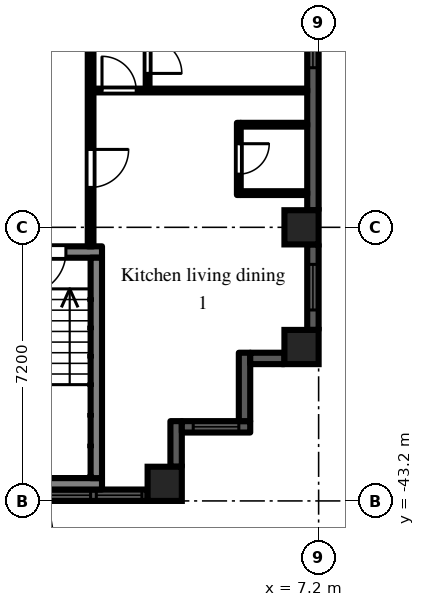
"""IFC4 building model, lengths in metres.
Left out: names, types, materials, properties, quantities, classifications, styles, units other than length and angle.
Written with IfcOpenShell. Run it as: python <this file> out.ifc"""

import sys

from ifc_helpers import new_model, si_unit, direction, frame, frame_2d, origin, origin_2d, place, context, subcontext, project, spatial, rectangle, extrude, element, fill, save


model = new_model("IFC4")
c1 = context("Model", 3, precision=1e-05, world=origin(), true_north=direction((0.0, 1.0)))
c2 = subcontext(c1, "Body", "Model", "MODEL_VIEW")
j1 = project(units=[si_unit("LENGTHUNIT", "METRE"), si_unit("PLANEANGLEUNIT", "RADIAN")], contexts=[c1])
p1 = place(None, origin())
s1 = spatial("IfcSite", under=j1, at=p1, CompositionType="ELEMENT")
p2 = place(p1, origin())
s2 = spatial("IfcBuilding", under=s1, at=p2, CompositionType="ELEMENT")
p3 = place(p2, frame((0.0, 0.0, 69.9)))
s3 = spatial("IfcBuildingStorey", under=s2, at=p3, CompositionType="ELEMENT", Elevation=69.9)
for number, where, z_axis, x_axis in (
    (1, (3.15, -42.75, 0.0), (0.0, 0.0, 1.0), (1.0, 0.0, 0.0)),
    (2, (6.75, -39.15, 0.0), (0.0, 0.0, 1.0), (1.0, 0.0, 0.0)),
    (3, (6.75, -36.0, 0.0), (0.0, 0.0, 1.0), (1.0, 0.0, 0.0)),
):
    element("IfcColumn", number, at=place(p3, frame(where, z_axis=z_axis, x_axis=x_axis)), inside=s3, PredefinedType="COLUMN", context=c2, shape_type="SweptSolid", body=[
        extrude(rectangle(XDim=0.9, YDim=0.9, at=origin_2d()), origin(), (0.0, 0.0, 1.0), 3.0),
    ])
p4 = place(p3, frame((-2.7, -43.05, 0.0), z_axis=(0.0, 0.0, 1.0), x_axis=(1.0, 0.0, 0.0)))
e4 = element("IfcWall", 4, at=p4, inside=s3, PredefinedType="SOLIDWALL", context=c2, shape_type="SweptSolid", body=[
    extrude(rectangle(XDim=5.4, YDim=0.3, at=frame_2d((2.7, 0.0))), origin(), (0.0, 0.0, 1.0), 2.1),
])
p5 = place(p4, frame((1.5, 0.0, 0.2)))
e5 = element("IfcOpeningElement", 5, at=p5, cuts=e4, PredefinedType="OPENING", context=c2, shape_type="SweptSolid", body=[
    extrude(rectangle(XDim=2.4, YDim=1.85, at=frame_2d((1.2, 0.925))), frame((0.0, 0.16, 0.0), z_axis=(0.0, -1.0, 0.0), x_axis=(1.0, 0.0, 0.0)), (0.0, 0.0, 1.0), 0.32),
])
p6 = place(p4, frame((0.15, 0.0, 0.2)))
e6 = element("IfcOpeningElement", 6, at=p6, cuts=e4, PredefinedType="OPENING", context=c2, shape_type="SweptSolid", body=[
    extrude(rectangle(XDim=1.2, YDim=1.85, at=frame_2d((0.6, 0.925))), frame((0.0, 0.16, 0.0), z_axis=(0.0, -1.0, 0.0), x_axis=(1.0, 0.0, 0.0)), (0.0, 0.0, 1.0), 0.32),
])
p7 = place(p4, frame((4.05, 0.0, 0.2)))
e7 = element("IfcOpeningElement", 7, at=p7, cuts=e4, PredefinedType="OPENING", context=c2, shape_type="SweptSolid", body=[
    extrude(rectangle(XDim=1.2, YDim=1.85, at=frame_2d((0.6, 0.925))), frame((0.0, 0.16, 0.0), z_axis=(0.0, -1.0, 0.0), x_axis=(1.0, 0.0, 0.0)), (0.0, 0.0, 1.0), 0.32),
])
p8 = place(p3, frame((3.45, -42.3, 0.0), z_axis=(0.0, 0.0, 1.0), x_axis=(0.0, 1.0, 0.0)))
e8 = element("IfcWall", 8, at=p8, inside=s3, PredefinedType="SOLIDWALL", context=c2, shape_type="SweptSolid", body=[
    extrude(rectangle(XDim=1.2, YDim=0.3, at=frame_2d((0.6, 0.0))), origin(), (0.0, 0.0, 1.0), 2.575),
])
p9 = place(p3, frame((3.6, -41.25, 0.0), z_axis=(0.0, 0.0, 1.0), x_axis=(1.0, 0.0, 0.0)))
e9 = element("IfcWall", 9, at=p9, inside=s3, PredefinedType="SOLIDWALL", context=c2, shape_type="SweptSolid", body=[
    extrude(rectangle(XDim=1.8, YDim=0.3, at=frame_2d((0.9, 0.0))), origin(), (0.0, 0.0, 1.0), 2.575),
])
p10 = place(p9, frame((0.3, 0.0, 0.2)))
e10 = element("IfcOpeningElement", 10, at=p10, cuts=e9, PredefinedType="OPENING", context=c2, shape_type="SweptSolid", body=[
    extrude(rectangle(XDim=1.2, YDim=1.85, at=frame_2d((0.6, 0.925))), frame((0.0, 0.16, 0.0), z_axis=(0.0, -1.0, 0.0), x_axis=(1.0, 0.0, 0.0)), (0.0, 0.0, 1.0), 0.32),
])
p11 = place(p3, frame((5.25, -41.1, 0.0), z_axis=(0.0, 0.0, 1.0), x_axis=(0.0, 1.0, 0.0)))
e11 = element("IfcWall", 11, at=p11, inside=s3, PredefinedType="SOLIDWALL", context=c2, shape_type="SweptSolid", body=[
    extrude(rectangle(XDim=1.8, YDim=0.3, at=frame_2d((0.9, 0.0))), origin(), (0.0, 0.0, 1.0), 2.575),
])
p12 = place(p3, frame((5.4, -39.45, 0.0), z_axis=(0.0, 0.0, 1.0), x_axis=(1.0, 0.0, 0.0)))
e12 = element("IfcWall", 12, at=p12, inside=s3, PredefinedType="SOLIDWALL", context=c2, shape_type="SweptSolid", body=[
    extrude(rectangle(XDim=0.9, YDim=0.3, at=frame_2d((0.45, 0.0))), origin(), (0.0, 0.0, 1.0), 2.575),
])
p13 = place(p3, frame((7.05, -38.7, 0.0), z_axis=(0.0, 0.0, 1.0), x_axis=(0.0, 1.0, 0.0)))
e13 = element("IfcWall", 13, at=p13, inside=s3, PredefinedType="SOLIDWALL", context=c2, shape_type="SweptSolid", body=[
    extrude(rectangle(XDim=2.25, YDim=0.3, at=frame_2d((1.125, 0.0))), origin(), (0.0, 0.0, 1.0), 2.1),
])
p14 = place(p13, frame((0.525, 0.0, 0.2)))
e14 = element("IfcOpeningElement", 14, at=p14, cuts=e13, PredefinedType="OPENING", context=c2, shape_type="SweptSolid", body=[
    extrude(rectangle(XDim=1.2, YDim=1.85, at=frame_2d((0.6, 0.925))), frame((0.0, 0.16, 0.0), z_axis=(0.0, -1.0, 0.0), x_axis=(1.0, 0.0, 0.0)), (0.0, 0.0, 1.0), 0.32),
])
p15 = place(p3, frame((7.05, -35.55, 0.0), z_axis=(0.0, 0.0, 1.0), x_axis=(0.0, 1.0, 0.0)))
e15 = element("IfcWall", 15, at=p15, inside=s3, PredefinedType="SOLIDWALL", context=c2, shape_type="SweptSolid", body=[
    extrude(rectangle(XDim=6.3, YDim=0.3, at=frame_2d((3.15, 0.0))), origin(), (0.0, 0.0, 1.0), 2.1),
])
p16 = place(p15, frame((3.75, 0.0, 0.2)))
e16 = element("IfcOpeningElement", 16, at=p16, cuts=e15, PredefinedType="OPENING", context=c2, shape_type="SweptSolid", body=[
    extrude(rectangle(XDim=2.4, YDim=1.85, at=frame_2d((1.2, 0.925))), frame((0.0, 0.16, 0.0), z_axis=(0.0, -1.0, 0.0), x_axis=(1.0, 0.0, 0.0)), (0.0, 0.0, 1.0), 0.32),
])
p17 = place(p3, frame((-1.5, -36.65, 0.0), z_axis=(0.0, 0.0, 1.0), x_axis=(1.0, 0.0, 0.0)))
e17 = element("IfcWall", 17, at=p17, inside=s3, PredefinedType="SHEAR", context=c2, shape_type="SweptSolid", body=[
    extrude(rectangle(XDim=3.0, YDim=0.3, at=frame_2d((1.5, 0.0))), origin(), (0.0, 0.0, 1.0), 2.575),
])
p18 = place(p17, frame((0.95, 0.0, 0.0)))
e18 = element("IfcOpeningElement", 18, at=p18, cuts=e17, PredefinedType="OPENING", context=c2, shape_type="SweptSolid", body=[
    extrude(rectangle(XDim=1.1, YDim=2.1, at=frame_2d((0.55, 1.05))), frame((0.0, 0.16, 0.0), z_axis=(0.0, -1.0, 0.0), x_axis=(1.0, 0.0, 0.0)), (0.0, 0.0, 1.0), 0.32),
])
p19 = place(p3, frame((-1.5, -42.75, 0.0), z_axis=(0.0, 0.0, 1.0), x_axis=(1.0, 0.0, 0.0)))
e19 = element("IfcWall", 19, at=p19, inside=s3, PredefinedType="SHEAR", context=c2, shape_type="SweptSolid", body=[
    extrude(rectangle(XDim=3.0, YDim=0.3, at=frame_2d((1.5, 0.0))), origin(), (0.0, 0.0, 1.0), 2.575),
])
p20 = place(p3, frame((1.35, -36.8, 0.0), z_axis=(0.0, 0.0, 1.0), x_axis=(0.0, -1.0, 0.0)))
e20 = element("IfcWall", 20, at=p20, inside=s3, PredefinedType="SHEAR", context=c2, shape_type="SweptSolid", body=[
    extrude(rectangle(XDim=5.8, YDim=0.3, at=frame_2d((2.9, 0.0))), origin(), (0.0, 0.0, 1.0), 2.575),
])
p21 = place(p3, frame((1.2, -36.5, 0.0), z_axis=(0.0, 0.0, 1.0), x_axis=(0.0, 1.0, 0.0)))
e21 = element("IfcWall", 21, at=p21, inside=s3, PredefinedType="PARTITIONING", context=c2, shape_type="SweptSolid", body=[
    extrude(rectangle(XDim=35.375, YDim=0.15, at=frame_2d((17.688, 0.0))), origin(), (0.0, 0.0, 1.0), 2.575),
])
p22 = place(p21, frame((31.85, 0.0, 0.0)))
e22 = element("IfcOpeningElement", 22, at=p22, cuts=e21, PredefinedType="OPENING", context=c2, shape_type="SweptSolid", body=[
    extrude(rectangle(XDim=0.9, YDim=2.1, at=frame_2d((0.45, 1.05))), frame((0.0, 0.085, 0.0), z_axis=(0.0, -1.0, 0.0), x_axis=(1.0, 0.0, 0.0)), (0.0, 0.0, 1.0), 0.17),
])
p23 = place(p21, frame((23.05, 0.0, 0.0)))
e23 = element("IfcOpeningElement", 23, at=p23, cuts=e21, PredefinedType="OPENING", context=c2, shape_type="SweptSolid", body=[
    extrude(rectangle(XDim=0.9, YDim=2.1, at=frame_2d((0.45, 1.05))), frame((0.0, 0.085, 0.0), z_axis=(0.0, -1.0, 0.0), x_axis=(1.0, 0.0, 0.0)), (0.0, 0.0, 1.0), 0.17),
])
p24 = place(p21, frame((26.65, 0.0, 0.0)))
e24 = element("IfcOpeningElement", 24, at=p24, cuts=e21, PredefinedType="OPENING", context=c2, shape_type="SweptSolid", body=[
    extrude(rectangle(XDim=0.9, YDim=2.1, at=frame_2d((0.45, 1.05))), frame((0.0, 0.085, 0.0), z_axis=(0.0, -1.0, 0.0), x_axis=(1.0, 0.0, 0.0)), (0.0, 0.0, 1.0), 0.17),
])
p25 = place(p21, frame((20.5, 0.0, 0.0)))
e25 = element("IfcOpeningElement", 25, at=p25, cuts=e21, PredefinedType="OPENING", context=c2, shape_type="SweptSolid", body=[
    extrude(rectangle(XDim=1.0, YDim=2.1, at=frame_2d((0.5, 1.05))), frame((0.0, 0.085, 0.0), z_axis=(0.0, -1.0, 0.0), x_axis=(1.0, 0.0, 0.0)), (0.0, 0.0, 1.0), 0.17),
])
p26 = place(p21, frame((1.55, 0.0, 0.0)))
e26 = element("IfcOpeningElement", 26, at=p26, cuts=e21, PredefinedType="OPENING", context=c2, shape_type="SweptSolid", body=[
    extrude(rectangle(XDim=1.0, YDim=2.1, at=frame_2d((0.5, 1.05))), frame((0.0, 0.085, 0.0), z_axis=(0.0, -1.0, 0.0), x_axis=(1.0, 0.0, 0.0)), (0.0, 0.0, 1.0), 0.17),
])
p27 = place(p3, frame((1.275, -32.4, 0.0), z_axis=(0.0, 0.0, 1.0), x_axis=(1.0, 0.0, 0.0)))
e27 = element("IfcWall", 27, at=p27, inside=s3, PredefinedType="PARTITIONING", context=c2, shape_type="SweptSolid", body=[
    extrude(rectangle(XDim=5.625, YDim=0.1, at=frame_2d((2.812, 0.0))), origin(), (0.0, 0.0, 1.0), 2.575),
])
p28 = place(p27, frame((0.225, 0.0, 0.0)))
e28 = element("IfcOpeningElement", 28, at=p28, cuts=e27, PredefinedType="OPENING", context=c2, shape_type="SweptSolid", body=[
    extrude(rectangle(XDim=0.9, YDim=2.1, at=frame_2d((0.45, 1.05))), frame((0.0, 0.06, 0.0), z_axis=(0.0, -1.0, 0.0), x_axis=(1.0, 0.0, 0.0)), (0.0, 0.0, 1.0), 0.12),
])
p29 = place(p3, frame((2.7, -32.35, 0.0), z_axis=(0.0, 0.0, 1.0), x_axis=(0.0, 1.0, 0.0)))
e29 = element("IfcWall", 29, at=p29, inside=s3, PredefinedType="PARTITIONING", context=c2, shape_type="SweptSolid", body=[
    extrude(rectangle(XDim=14.25, YDim=0.1, at=frame_2d((7.125, 0.0))), origin(), (0.0, 0.0, 1.0), 2.575),
])
p30 = place(p29, frame((0.4, 0.0, 0.0)))
e30 = element("IfcOpeningElement", 30, at=p30, cuts=e29, PredefinedType="OPENING", context=c2, shape_type="SweptSolid", body=[
    extrude(rectangle(XDim=0.9, YDim=2.1, at=frame_2d((0.45, 1.05))), frame((0.0, 0.06, 0.0), z_axis=(0.0, -1.0, 0.0), x_axis=(1.0, 0.0, 0.0)), (0.0, 0.0, 1.0), 0.12),
])
p31 = place(p29, frame((5.8, 0.0, 0.0)))
e31 = element("IfcOpeningElement", 31, at=p31, cuts=e29, PredefinedType="OPENING", context=c2, shape_type="SweptSolid", body=[
    extrude(rectangle(XDim=0.9, YDim=2.1, at=frame_2d((0.45, 1.05))), frame((0.0, 0.06, 0.0), z_axis=(0.0, -1.0, 0.0), x_axis=(1.0, 0.0, 0.0)), (0.0, 0.0, 1.0), 0.12),
])
p32 = place(p29, frame((7.6, 0.0, 0.0)))
e32 = element("IfcOpeningElement", 32, at=p32, cuts=e29, PredefinedType="OPENING", context=c2, shape_type="SweptSolid", body=[
    extrude(rectangle(XDim=0.9, YDim=2.1, at=frame_2d((0.45, 1.05))), frame((0.0, 0.06, 0.0), z_axis=(0.0, -1.0, 0.0), x_axis=(1.0, 0.0, 0.0)), (0.0, 0.0, 1.0), 0.12),
])
p33 = place(p29, frame((13.0, 0.0, 0.0)))
e33 = element("IfcOpeningElement", 33, at=p33, cuts=e29, PredefinedType="OPENING", context=c2, shape_type="SweptSolid", body=[
    extrude(rectangle(XDim=0.9, YDim=2.1, at=frame_2d((0.45, 1.05))), frame((0.0, 0.06, 0.0), z_axis=(0.0, -1.0, 0.0), x_axis=(1.0, 0.0, 0.0)), (0.0, 0.0, 1.0), 0.12),
])
p34 = place(p3, frame((5.1, -35.15, 0.0), z_axis=(0.0, 0.0, 1.0), x_axis=(0.0, 1.0, 0.0)))
e34 = element("IfcWall", 34, at=p34, inside=s3, PredefinedType="PARTITIONING", context=c2, shape_type="SweptSolid", body=[
    extrude(rectangle(XDim=1.9, YDim=0.1, at=frame_2d((0.95, 0.0))), origin(), (0.0, 0.0, 1.0), 2.575),
])
p35 = place(p34, frame((0.55, 0.0, 0.0)))
e35 = element("IfcOpeningElement", 35, at=p35, cuts=e34, PredefinedType="OPENING", context=c2, shape_type="SweptSolid", body=[
    extrude(rectangle(XDim=0.8, YDim=2.1, at=frame_2d((0.4, 1.05))), frame((0.0, 0.06, 0.0), z_axis=(0.0, -1.0, 0.0), x_axis=(1.0, 0.0, 0.0)), (0.0, 0.0, 1.0), 0.12),
])
for number, where, z_axis, x_axis in (
    (36, (5.15, -35.1, 0.0), (0.0, 0.0, 1.0), (1.0, 0.0, 0.0)),
    (37, (5.15, -33.3, 0.0), (0.0, 0.0, 1.0), (1.0, 0.0, 0.0)),
):
    element("IfcWall", number, at=place(p3, frame(where, z_axis=z_axis, x_axis=x_axis)), inside=s3, PredefinedType="PARTITIONING", context=c2, shape_type="SweptSolid", body=[
        extrude(rectangle(XDim=1.75, YDim=0.1, at=frame_2d((0.875, 0.0))), origin(), (0.0, 0.0, 1.0), 2.575),
    ])
p36 = place(p5, origin())
e38 = element("IfcWindow", 38, at=p36, inside=s3, PartitioningType="SINGLE_PANEL", PredefinedType="WINDOW", context=c2, shape_type="SweptSolid", body=[
    extrude(rectangle(XDim=2.4, YDim=1.85, at=frame_2d((1.2, 0.925))), frame((0.0, 0.03, 0.0), z_axis=(0.0, -1.0, 0.0), x_axis=(1.0, 0.0, 0.0)), (0.0, 0.0, 1.0), 0.06),
])
fill(e5, e38)
p37 = place(p7, origin())
e39 = element("IfcWindow", 39, at=p37, inside=s3, PartitioningType="SINGLE_PANEL", PredefinedType="WINDOW", context=c2, shape_type="SweptSolid", body=[
    extrude(rectangle(XDim=1.2, YDim=1.85, at=frame_2d((0.6, 0.925))), frame((0.0, 0.03, 0.0), z_axis=(0.0, -1.0, 0.0), x_axis=(1.0, 0.0, 0.0)), (0.0, 0.0, 1.0), 0.06),
])
fill(e7, e39)
p38 = place(p10, origin())
e40 = element("IfcWindow", 40, at=p38, inside=s3, PartitioningType="SINGLE_PANEL", PredefinedType="WINDOW", context=c2, shape_type="SweptSolid", body=[
    extrude(rectangle(XDim=1.2, YDim=1.85, at=frame_2d((0.6, 0.925))), frame((0.0, 0.03, 0.0), z_axis=(0.0, -1.0, 0.0), x_axis=(1.0, 0.0, 0.0)), (0.0, 0.0, 1.0), 0.06),
])
fill(e10, e40)
p39 = place(p14, origin())
e41 = element("IfcWindow", 41, at=p39, inside=s3, PartitioningType="SINGLE_PANEL", PredefinedType="WINDOW", context=c2, shape_type="SweptSolid", body=[
    extrude(rectangle(XDim=1.2, YDim=1.85, at=frame_2d((0.6, 0.925))), frame((0.0, 0.03, 0.0), z_axis=(0.0, -1.0, 0.0), x_axis=(1.0, 0.0, 0.0)), (0.0, 0.0, 1.0), 0.06),
])
fill(e14, e41)
p40 = place(p16, origin())
e42 = element("IfcWindow", 42, at=p40, inside=s3, PartitioningType="SINGLE_PANEL", PredefinedType="WINDOW", context=c2, shape_type="SweptSolid", body=[
    extrude(rectangle(XDim=2.4, YDim=1.85, at=frame_2d((1.2, 0.925))), frame((0.0, 0.03, 0.0), z_axis=(0.0, -1.0, 0.0), x_axis=(1.0, 0.0, 0.0)), (0.0, 0.0, 1.0), 0.06),
])
fill(e16, e42)
p41 = place(p18, frame((1.1, 0.0, 0.0), z_axis=(0.0, 0.0, 1.0), x_axis=(-1.0, 0.0, 0.0)))
e43 = element("IfcDoor", 43, at=p41, inside=s3, OperationType="SINGLE_SWING_RIGHT", PredefinedType="DOOR", context=c2, shape_type="SweptSolid", body=[
    extrude(rectangle(XDim=1.1, YDim=2.1, at=frame_2d((0.55, 1.05))), frame((0.0, 0.025, 0.0), z_axis=(0.0, -1.0, 0.0), x_axis=(1.0, 0.0, 0.0)), (0.0, 0.0, 1.0), 0.05),
])
fill(e18, e43)
p42 = place(p35, frame((0.8, 0.0, 0.0), z_axis=(0.0, 0.0, 1.0), x_axis=(-1.0, 0.0, 0.0)))
e44 = element("IfcDoor", 44, at=p42, inside=s3, OperationType="SINGLE_SWING_LEFT", PredefinedType="DOOR", context=c2, shape_type="SweptSolid", body=[
    extrude(rectangle(XDim=0.8, YDim=2.1, at=frame_2d((0.4, 1.05))), frame((0.0, 0.025, 0.0), z_axis=(0.0, -1.0, 0.0), x_axis=(1.0, 0.0, 0.0)), (0.0, 0.0, 1.0), 0.05),
])
fill(e35, e44)
p43 = place(p26, frame((1.0, 0.0, 0.0), z_axis=(0.0, 0.0, 1.0), x_axis=(-1.0, 0.0, 0.0)))
e45 = element("IfcDoor", 45, at=p43, inside=s3, OperationType="SINGLE_SWING_LEFT", PredefinedType="DOOR", context=c2, shape_type="SweptSolid", body=[
    extrude(rectangle(XDim=1.0, YDim=2.1, at=frame_2d((0.5, 1.05))), frame((0.0, 0.025, 0.0), z_axis=(0.0, -1.0, 0.0), x_axis=(1.0, 0.0, 0.0)), (0.0, 0.0, 1.0), 0.05),
])
fill(e26, e45)
p44 = place(p28, origin())
e46 = element("IfcDoor", 46, at=p44, inside=s3, OperationType="SINGLE_SWING_LEFT", PredefinedType="DOOR", context=c2, shape_type="SweptSolid", body=[
    extrude(rectangle(XDim=0.9, YDim=2.1, at=frame_2d((0.45, 1.05))), frame((0.0, 0.025, 0.0), z_axis=(0.0, -1.0, 0.0), x_axis=(1.0, 0.0, 0.0)), (0.0, 0.0, 1.0), 0.05),
])
fill(e28, e46)
p45 = place(p30, frame((0.9, 0.0, 0.0), z_axis=(0.0, 0.0, 1.0), x_axis=(-1.0, 0.0, 0.0)))
e47 = element("IfcDoor", 47, at=p45, inside=s3, OperationType="SINGLE_SWING_RIGHT", PredefinedType="DOOR", context=c2, shape_type="SweptSolid", body=[
    extrude(rectangle(XDim=0.9, YDim=2.1, at=frame_2d((0.45, 1.05))), frame((0.0, 0.025, 0.0), z_axis=(0.0, -1.0, 0.0), x_axis=(1.0, 0.0, 0.0)), (0.0, 0.0, 1.0), 0.05),
])
fill(e30, e47)
save(model, sys.argv[1])
